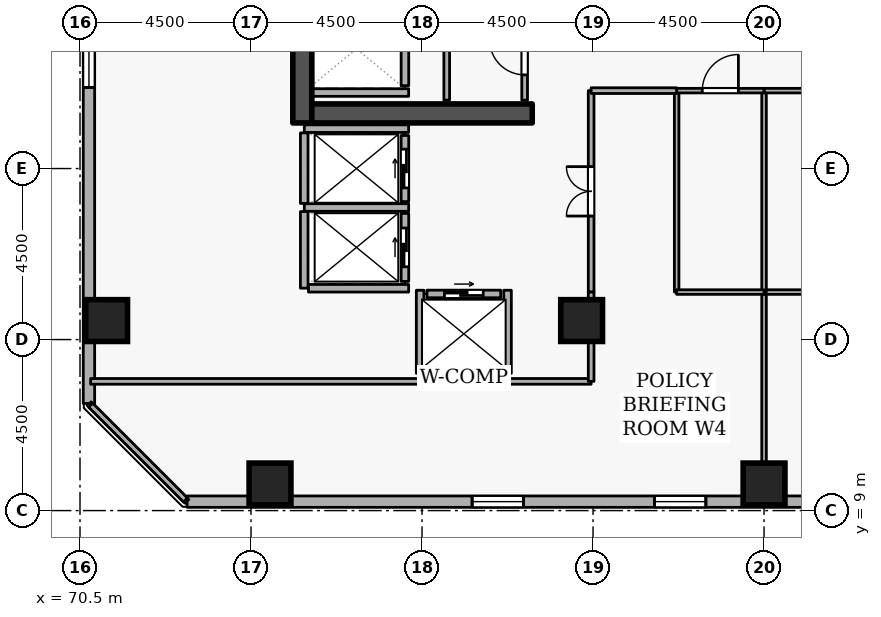
"""IFC4 building model, lengths in metres.
Left out: names, types, materials, properties, quantities, classifications, styles, units other than length and angle.
Written with IfcOpenShell. Run it as: python <this file> out.ifc"""

import sys

from ifc_helpers import new_model, si_unit, direction, frame, frame_2d, origin, origin_2d, place, context, subcontext, project, spatial, rectangle, extrude, element, fill, save


model = new_model("IFC4")
c1 = context("Model", 3, precision=1e-05, world=origin(), true_north=direction((0.0, 1.0)))
c2 = subcontext(c1, "Body", "Model", "MODEL_VIEW")
j1 = project(units=[si_unit("LENGTHUNIT", "METRE"), si_unit("PLANEANGLEUNIT", "RADIAN")], contexts=[c1])
p1 = place(None, origin())
s1 = spatial("IfcSite", under=j1, at=p1, CompositionType="ELEMENT")
p2 = place(p1, origin())
s2 = spatial("IfcBuilding", under=s1, at=p2, CompositionType="ELEMENT")
p3 = place(p2, frame((0.0, 0.0, 170.7)))
s3 = spatial("IfcBuildingStorey", under=s2, at=p3, CompositionType="ELEMENT", Elevation=170.7)
p4 = place(p3, frame((76.35, 19.2, 0.0), z_axis=(0.0, 0.0, 1.0), x_axis=(0.0, 1.0, 0.0)))
e1 = element("IfcWall", 1, at=p4, inside=s3, PredefinedType="SHEAR", context=c2, shape_type="SweptSolid", body=[
    extrude(rectangle(XDim=15.6, YDim=0.5, at=frame_2d((7.8, 0.0))), origin(), (0.0, 0.0, 1.0), 3.6),
])
p5 = place(p3, frame((76.6, 19.45, 0.0), z_axis=(0.0, 0.0, 1.0), x_axis=(1.0, 0.0, 0.0)))
e2 = element("IfcWall", 2, at=p5, inside=s3, PredefinedType="SHEAR", context=c2, shape_type="SweptSolid", body=[
    extrude(rectangle(XDim=5.8, YDim=0.5, at=frame_2d((2.9, 0.0))), origin(), (0.0, 0.0, 1.0), 3.6),
])
for number, where, z_axis, x_axis in (
    (3, (71.2, 14.0, 0.0), (0.0, 0.0, 1.0), (1.0, 0.0, 0.0)),
    (4, (88.5, 9.7, 0.0), (0.0, 0.0, 1.0), (1.0, 0.0, 0.0)),
    (5, (75.5, 9.7, 0.0), (0.0, 0.0, 1.0), (1.0, 0.0, 0.0)),
    (6, (83.7, 14.0, 0.0), (0.0, 0.0, 1.0), (1.0, 0.0, 0.0)),
):
    element("IfcColumn", number, at=place(p3, frame(where, z_axis=z_axis, x_axis=x_axis)), inside=s3, PredefinedType="COLUMN", context=c2, shape_type="SweptSolid", body=[
        extrude(rectangle(XDim=1.1, YDim=1.1, at=origin_2d()), origin(), (0.0, 0.0, 1.0), 3.6),
    ])
p6 = place(p3, frame((73.319, 9.235, 0.0), z_axis=(0.0, 0.0, 1.0), x_axis=(1.0, 0.0, 0.0)))
e7 = element("IfcWall", 7, at=p6, inside=s3, PredefinedType="STANDARD", context=c2, shape_type="SweptSolid", body=[
    extrude(rectangle(XDim=36.363, YDim=0.3, at=frame_2d((18.181, 0.0))), origin(), (0.0, 0.0, 1.0), 2.22),
])
p7 = place(p6, frame((7.5, 0.0, 0.72)))
e8 = element("IfcOpeningElement", 8, at=p7, cuts=e7, PredefinedType="OPENING", context=c2, shape_type="SweptSolid", body=[
    extrude(rectangle(XDim=1.35, YDim=1.05, at=frame_2d((0.675, 0.525))), frame((0.0, 0.16, 0.0), z_axis=(0.0, -1.0, 0.0), x_axis=(1.0, 0.0, 0.0)), (0.0, 0.0, 1.0), 0.32),
])
p8 = place(p6, frame((12.3, 0.0, 0.72)))
e9 = element("IfcOpeningElement", 9, at=p8, cuts=e7, PredefinedType="OPENING", context=c2, shape_type="SweptSolid", body=[
    extrude(rectangle(XDim=1.35, YDim=1.05, at=frame_2d((0.675, 0.525))), frame((0.0, 0.16, 0.0), z_axis=(0.0, -1.0, 0.0), x_axis=(1.0, 0.0, 0.0)), (0.0, 0.0, 1.0), 0.32),
])
p9 = place(p6, frame((17.1, 0.0, 0.72)))
e10 = element("IfcOpeningElement", 10, at=p9, cuts=e7, PredefinedType="OPENING", context=c2, shape_type="SweptSolid", body=[
    extrude(rectangle(XDim=1.35, YDim=1.05, at=frame_2d((0.675, 0.525))), frame((0.0, 0.16, 0.0), z_axis=(0.0, -1.0, 0.0), x_axis=(1.0, 0.0, 0.0)), (0.0, 0.0, 1.0), 0.32),
])
p10 = place(p6, frame((21.9, 0.0, 0.72)))
e11 = element("IfcOpeningElement", 11, at=p10, cuts=e7, PredefinedType="OPENING", context=c2, shape_type="SweptSolid", body=[
    extrude(rectangle(XDim=1.35, YDim=1.05, at=frame_2d((0.675, 0.525))), frame((0.0, 0.16, 0.0), z_axis=(0.0, -1.0, 0.0), x_axis=(1.0, 0.0, 0.0)), (0.0, 0.0, 1.0), 0.32),
])
p11 = place(p6, frame((31.5, 0.0, 0.72)))
e12 = element("IfcOpeningElement", 12, at=p11, cuts=e7, PredefinedType="OPENING", context=c2, shape_type="SweptSolid", body=[
    extrude(rectangle(XDim=1.35, YDim=1.05, at=frame_2d((0.675, 0.525))), frame((0.0, 0.16, 0.0), z_axis=(0.0, -1.0, 0.0), x_axis=(1.0, 0.0, 0.0)), (0.0, 0.0, 1.0), 0.32),
])
p12 = place(p3, frame((70.735, 48.181, 0.0), z_axis=(0.0, 0.0, 1.0), x_axis=(0.0, -1.0, 0.0)))
e13 = element("IfcWall", 13, at=p12, inside=s3, PredefinedType="STANDARD", context=c2, shape_type="SweptSolid", body=[
    extrude(rectangle(XDim=36.363, YDim=0.3, at=frame_2d((18.181, 0.0))), origin(), (0.0, 0.0, 1.0), 2.22),
])
p13 = place(p12, frame((2.7, 0.0, 0.72)))
e14 = element("IfcOpeningElement", 14, at=p13, cuts=e13, PredefinedType="OPENING", context=c2, shape_type="SweptSolid", body=[
    extrude(rectangle(XDim=1.35, YDim=1.05, at=frame_2d((0.675, 0.525))), frame((0.0, 0.16, 0.0), z_axis=(0.0, -1.0, 0.0), x_axis=(1.0, 0.0, 0.0)), (0.0, 0.0, 1.0), 0.32),
])
p14 = place(p12, frame((12.3, 0.0, 0.72)))
e15 = element("IfcOpeningElement", 15, at=p14, cuts=e13, PredefinedType="OPENING", context=c2, shape_type="SweptSolid", body=[
    extrude(rectangle(XDim=1.35, YDim=1.05, at=frame_2d((0.675, 0.525))), frame((0.0, 0.16, 0.0), z_axis=(0.0, -1.0, 0.0), x_axis=(1.0, 0.0, 0.0)), (0.0, 0.0, 1.0), 0.32),
])
p15 = place(p12, frame((17.1, 0.0, 0.72)))
e16 = element("IfcOpeningElement", 16, at=p15, cuts=e13, PredefinedType="OPENING", context=c2, shape_type="SweptSolid", body=[
    extrude(rectangle(XDim=1.35, YDim=1.05, at=frame_2d((0.675, 0.525))), frame((0.0, 0.16, 0.0), z_axis=(0.0, -1.0, 0.0), x_axis=(1.0, 0.0, 0.0)), (0.0, 0.0, 1.0), 0.32),
])
p16 = place(p12, frame((26.7, 0.0, 0.72)))
e17 = element("IfcOpeningElement", 17, at=p16, cuts=e13, PredefinedType="OPENING", context=c2, shape_type="SweptSolid", body=[
    extrude(rectangle(XDim=1.35, YDim=1.05, at=frame_2d((0.675, 0.525))), frame((0.0, 0.16, 0.0), z_axis=(0.0, -1.0, 0.0), x_axis=(1.0, 0.0, 0.0)), (0.0, 0.0, 1.0), 0.32),
])
p17 = place(p3, frame((79.05, 20.18, 0.0), z_axis=(0.0, 0.0, 1.0), x_axis=(0.0, 1.0, 0.0)))
e18 = element("IfcWall", 18, at=p17, inside=s3, PredefinedType="STANDARD", context=c2, shape_type="SweptSolid", body=[
    extrude(rectangle(XDim=1.94, YDim=0.2, at=frame_2d((0.97, 0.0))), origin(), (0.0, 0.0, 1.0), 3.26),
])
p18 = place(p3, frame((79.05, 17.13, 0.0), z_axis=(0.0, 0.0, 1.0), x_axis=(0.0, 1.0, 0.0)))
e19 = element("IfcWall", 19, at=p18, inside=s3, PredefinedType="STANDARD", context=c2, shape_type="SweptSolid", body=[
    extrude(rectangle(XDim=1.74, YDim=0.2, at=frame_2d((0.87, 0.0))), origin(), (0.0, 0.0, 1.0), 3.26),
])
p19 = place(p18, frame((0.36, 0.0, 0.0)))
e20 = element("IfcOpeningElement", 20, at=p19, cuts=e19, PredefinedType="OPENING", context=c2, shape_type="SweptSolid", body=[
    extrude(rectangle(XDim=1.02, YDim=2.06, at=frame_2d((0.51, 1.03))), frame((0.0, 0.11, 0.0), z_axis=(0.0, -1.0, 0.0), x_axis=(1.0, 0.0, 0.0)), (0.0, 0.0, 1.0), 0.22),
])
p20 = place(p3, frame((79.05, 15.03, 0.0), z_axis=(0.0, 0.0, 1.0), x_axis=(0.0, 1.0, 0.0)))
e21 = element("IfcWall", 21, at=p20, inside=s3, PredefinedType="STANDARD", context=c2, shape_type="SweptSolid", body=[
    extrude(rectangle(XDim=1.79, YDim=0.2, at=frame_2d((0.895, 0.0))), origin(), (0.0, 0.0, 1.0), 3.26),
])
p21 = place(p20, frame((0.385, 0.0, 0.0)))
e22 = element("IfcOpeningElement", 22, at=p21, cuts=e21, PredefinedType="OPENING", context=c2, shape_type="SweptSolid", body=[
    extrude(rectangle(XDim=1.02, YDim=2.06, at=frame_2d((0.51, 1.03))), frame((0.0, 0.11, 0.0), z_axis=(0.0, -1.0, 0.0), x_axis=(1.0, 0.0, 0.0)), (0.0, 0.0, 1.0), 0.22),
])
p22 = place(p3, frame((79.63, 14.7, 0.0), z_axis=(0.0, 0.0, 1.0), x_axis=(1.0, 0.0, 0.0)))
e23 = element("IfcWall", 23, at=p22, inside=s3, PredefinedType="STANDARD", context=c2, shape_type="SweptSolid", body=[
    extrude(rectangle(XDim=1.94, YDim=0.2, at=frame_2d((0.97, 0.0))), origin(), (0.0, 0.0, 1.0), 3.26),
])
p23 = place(p22, frame((0.46, 0.0, 0.0)))
e24 = element("IfcOpeningElement", 24, at=p23, cuts=e23, PredefinedType="OPENING", context=c2, shape_type="SweptSolid", body=[
    extrude(rectangle(XDim=1.02, YDim=2.06, at=frame_2d((0.51, 1.03))), frame((0.0, 0.11, 0.0), z_axis=(0.0, -1.0, 0.0), x_axis=(1.0, 0.0, 0.0)), (0.0, 0.0, 1.0), 0.22),
])
p24 = place(p3, frame((76.612, 20.0, 0.0), z_axis=(0.0, 0.0, 1.0), x_axis=(1.0, 0.0, 0.0)))
e25 = element("IfcWall", 25, at=p24, inside=s3, PredefinedType="STANDARD", context=c2, shape_type="SweptSolid", body=[
    extrude(rectangle(XDim=2.536, YDim=0.2, at=frame_2d((1.268, 0.0))), origin(), (0.0, 0.0, 1.0), 3.26),
])
p25 = place(p3, frame((76.402, 19.05, 0.0), z_axis=(0.0, 0.0, 1.0), x_axis=(1.0, 0.0, 0.0)))
e26 = element("IfcWall", 26, at=p25, inside=s3, PredefinedType="STANDARD", context=c2, shape_type="SweptSolid", body=[
    extrude(rectangle(XDim=2.746, YDim=0.2, at=frame_2d((1.373, 0.0))), origin(), (0.0, 0.0, 1.0), 2.465),
])
p26 = place(p3, frame((76.402, 16.975, 0.0), z_axis=(0.0, 0.0, 1.0), x_axis=(1.0, 0.0, 0.0)))
e27 = element("IfcWall", 27, at=p26, inside=s3, PredefinedType="STANDARD", context=c2, shape_type="SweptSolid", body=[
    extrude(rectangle(XDim=2.746, YDim=0.2, at=frame_2d((1.373, 0.0))), origin(), (0.0, 0.0, 1.0), 3.26),
])
p27 = place(p3, frame((76.4, 14.852, 0.0), z_axis=(0.0, 0.0, 1.0), x_axis=(0.0, 1.0, 0.0)))
e28 = element("IfcWall", 28, at=p27, inside=s3, PredefinedType="STANDARD", context=c2, shape_type="SweptSolid", body=[
    extrude(rectangle(XDim=2.016, YDim=0.2, at=frame_2d((1.008, 0.0))), origin(), (0.0, 0.0, 1.0), 3.26),
])
p28 = place(p3, frame((76.4, 17.082, 0.0), z_axis=(0.0, 0.0, 1.0), x_axis=(0.0, 1.0, 0.0)))
e29 = element("IfcWall", 29, at=p28, inside=s3, PredefinedType="STANDARD", context=c2, shape_type="SweptSolid", body=[
    extrude(rectangle(XDim=1.856, YDim=0.2, at=frame_2d((0.928, 0.0))), origin(), (0.0, 0.0, 1.0), 3.26),
])
p29 = place(p3, frame((76.512, 14.85, 0.0), z_axis=(0.0, 0.0, 1.0), x_axis=(1.0, 0.0, 0.0)))
e30 = element("IfcWall", 30, at=p29, inside=s3, PredefinedType="STANDARD", context=c2, shape_type="SweptSolid", body=[
    extrude(rectangle(XDim=2.636, YDim=0.2, at=frame_2d((1.318, 0.0))), origin(), (0.0, 0.0, 1.0), 3.26),
])
p30 = place(p3, frame((79.452, 12.5, 0.0), z_axis=(0.0, 0.0, 1.0), x_axis=(1.0, 0.0, 0.0)))
e31 = element("IfcWall", 31, at=p30, inside=s3, PredefinedType="STANDARD", context=c2, shape_type="SweptSolid", body=[
    extrude(rectangle(XDim=2.296, YDim=0.2, at=frame_2d((1.148, 0.0))), origin(), (0.0, 0.0, 1.0), 3.26),
])
for number, where, z_axis, x_axis in (
    (32, (81.75, 12.612, 0.0), (0.0, 0.0, 1.0), (0.0, 1.0, 0.0)),
    (33, (79.45, 12.612, 0.0), (0.0, 0.0, 1.0), (0.0, 1.0, 0.0)),
):
    element("IfcWall", number, at=place(p3, frame(where, z_axis=z_axis, x_axis=x_axis)), inside=s3, PredefinedType="STANDARD", context=c2, shape_type="SweptSolid", body=[
        extrude(rectangle(XDim=2.186, YDim=0.2, at=frame_2d((1.093, 0.0))), origin(), (0.0, 0.0, 1.0), 3.26),
    ])
p31 = place(p3, frame((82.2, 19.8, 0.0), z_axis=(0.0, 0.0, 1.0), x_axis=(0.0, 1.0, 0.0)))
e34 = element("IfcWall", 34, at=p31, inside=s3, PredefinedType="PARTITIONING", context=c2, shape_type="SweptSolid", body=[
    extrude(rectangle(XDim=2.25, YDim=0.15, at=frame_2d((1.125, 0.0))), origin(), (0.0, 0.0, 1.0), 3.26),
])
p32 = place(p31, frame((0.665, 0.0, 0.0)))
e35 = element("IfcOpeningElement", 35, at=p32, cuts=e34, PredefinedType="OPENING", context=c2, shape_type="SweptSolid", body=[
    extrude(rectangle(XDim=0.92, YDim=2.08, at=frame_2d((0.46, 1.04))), frame((0.0, 0.085, 0.0), z_axis=(0.0, -1.0, 0.0), x_axis=(1.0, 0.0, 0.0)), (0.0, 0.0, 1.0), 0.17),
])
p33 = place(p3, frame((80.15, 22.05, 0.0), z_axis=(0.0, 0.0, 1.0), x_axis=(0.0, -1.0, 0.0)))
e36 = element("IfcWall", 36, at=p33, inside=s3, PredefinedType="PARTITIONING", context=c2, shape_type="SweptSolid", body=[
    extrude(rectangle(XDim=2.25, YDim=0.15, at=frame_2d((1.125, 0.0))), origin(), (0.0, 0.0, 1.0), 3.26),
])
p34 = place(p3, frame((88.5, 9.28, 0.0), z_axis=(0.0, 0.0, 1.0), x_axis=(0.0, 1.0, 0.0)))
e37 = element("IfcWall", 37, at=p34, inside=s3, PredefinedType="PARTITIONING", context=c2, shape_type="SweptSolid", body=[
    extrude(rectangle(XDim=5.47, YDim=0.12, at=frame_2d((2.735, 0.0))), origin(), (0.0, 0.0, 1.0), 2.802),
])
p35 = place(p3, frame((88.5, 14.75, 0.0), z_axis=(0.0, 0.0, 1.0), x_axis=(1.0, 0.0, 0.0)))
e38 = element("IfcWall", 38, at=p35, inside=s3, PredefinedType="PARTITIONING", context=c2, shape_type="SweptSolid", body=[
    extrude(rectangle(XDim=4.55, YDim=0.12, at=frame_2d((2.275, 0.0))), origin(), (0.0, 0.0, 1.0), 3.26),
])
p36 = place(p3, frame((88.5, 14.75, 0.0), z_axis=(0.0, 0.0, 1.0), x_axis=(0.0, 1.0, 0.0)))
e39 = element("IfcWall", 39, at=p36, inside=s3, PredefinedType="PARTITIONING", context=c2, shape_type="SweptSolid", body=[
    extrude(rectangle(XDim=5.3, YDim=0.12, at=frame_2d((2.65, 0.0))), origin(), (0.0, 0.0, 1.0), 2.802),
])
p37 = place(p3, frame((88.5, 20.05, 0.0), z_axis=(0.0, 0.0, 1.0), x_axis=(1.0, 0.0, 0.0)))
e40 = element("IfcWall", 40, at=p37, inside=s3, PredefinedType="PARTITIONING", context=c2, shape_type="SweptSolid", body=[
    extrude(rectangle(XDim=4.55, YDim=0.12, at=frame_2d((2.275, 0.0))), origin(), (0.0, 0.0, 1.0), 3.26),
])
p38 = place(p3, frame((86.2, 14.75, 0.0), z_axis=(0.0, 0.0, 1.0), x_axis=(0.0, 1.0, 0.0)))
e41 = element("IfcWall", 41, at=p38, inside=s3, PredefinedType="PARTITIONING", context=c2, shape_type="SweptSolid", body=[
    extrude(rectangle(XDim=5.3, YDim=0.12, at=frame_2d((2.65, 0.0))), origin(), (0.0, 0.0, 1.0), 3.26),
])
p39 = place(p3, frame((86.2, 20.05, 0.0), z_axis=(0.0, 0.0, 1.0), x_axis=(1.0, 0.0, 0.0)))
e42 = element("IfcWall", 42, at=p39, inside=s3, PredefinedType="PARTITIONING", context=c2, shape_type="SweptSolid", body=[
    extrude(rectangle(XDim=2.3, YDim=0.12, at=frame_2d((1.15, 0.0))), origin(), (0.0, 0.0, 1.0), 3.26),
])
p40 = place(p39, frame((0.675, 0.0, 0.0)))
e43 = element("IfcOpeningElement", 43, at=p40, cuts=e42, PredefinedType="OPENING", context=c2, shape_type="SweptSolid", body=[
    extrude(rectangle(XDim=0.95, YDim=2.1, at=frame_2d((0.475, 1.05))), frame((0.0, 0.07, 0.0), z_axis=(0.0, -1.0, 0.0), x_axis=(1.0, 0.0, 0.0)), (0.0, 0.0, 1.0), 0.14),
])
p41 = place(p3, frame((88.5, 14.75, 0.0), z_axis=(0.0, 0.0, 1.0), x_axis=(-1.0, 0.0, 0.0)))
e44 = element("IfcWall", 44, at=p41, inside=s3, PredefinedType="PARTITIONING", context=c2, shape_type="SweptSolid", body=[
    extrude(rectangle(XDim=2.3, YDim=0.12, at=frame_2d((1.15, 0.0))), origin(), (0.0, 0.0, 1.0), 3.26),
])
p42 = place(p3, frame((83.95, 14.75, 0.0), z_axis=(0.0, 0.0, 1.0), x_axis=(0.0, 1.0, 0.0)))
e45 = element("IfcWall", 45, at=p42, inside=s3, PredefinedType="PARTITIONING", context=c2, shape_type="SweptSolid", body=[
    extrude(rectangle(XDim=5.3, YDim=0.15, at=frame_2d((2.65, 0.0))), origin(), (0.0, 0.0, 1.0), 3.26),
])
p43 = place(p42, frame((2.0, 0.0, 0.0)))
e46 = element("IfcOpeningElement", 46, at=p43, cuts=e45, PredefinedType="OPENING", context=c2, shape_type="SweptSolid", body=[
    extrude(rectangle(XDim=1.3, YDim=2.12, at=frame_2d((0.65, 1.06))), frame((0.0, 0.085, 0.0), z_axis=(0.0, -1.0, 0.0), x_axis=(1.0, 0.0, 0.0)), (0.0, 0.0, 1.0), 0.17),
])
p44 = place(p3, frame((83.95, 20.05, 0.0), z_axis=(0.0, 0.0, 1.0), x_axis=(1.0, 0.0, 0.0)))
e47 = element("IfcWall", 47, at=p44, inside=s3, PredefinedType="PARTITIONING", context=c2, shape_type="SweptSolid", body=[
    extrude(rectangle(XDim=2.25, YDim=0.15, at=frame_2d((1.125, 0.0))), origin(), (0.0, 0.0, 1.0), 3.26),
])
p45 = place(p3, frame((73.275, 9.28, 0.0), z_axis=(0.0, 0.0, 1.0), x_axis=(-0.707106781187, 0.707106781187, 0.0)))
e48 = element("IfcWall", 48, at=p45, inside=s3, PredefinedType="PARTITIONING", context=c2, shape_type="SweptSolid", body=[
    extrude(rectangle(XDim=3.528, YDim=0.15, at=frame_2d((1.764, 0.0))), origin(), (0.0, 0.0, 1.0), 3.26),
])
p46 = place(p3, frame((70.78, 12.4, 0.0), z_axis=(0.0, 0.0, 1.0), x_axis=(1.0, 0.0, 0.0)))
e49 = element("IfcWall", 49, at=p46, inside=s3, PredefinedType="PARTITIONING", context=c2, shape_type="SweptSolid", body=[
    extrude(rectangle(XDim=8.672, YDim=0.15, at=frame_2d((4.336, 0.0))), origin(), (0.0, 0.0, 1.0), 3.26),
])
p47 = place(p3, frame((81.748, 12.4, 0.0), z_axis=(0.0, 0.0, 1.0), x_axis=(1.0, 0.0, 0.0)))
e50 = element("IfcWall", 50, at=p47, inside=s3, PredefinedType="PARTITIONING", context=c2, shape_type="SweptSolid", body=[
    extrude(rectangle(XDim=2.202, YDim=0.15, at=frame_2d((1.101, 0.0))), origin(), (0.0, 0.0, 1.0), 3.26),
])
p48 = place(p3, frame((83.95, 12.4, 0.0), z_axis=(0.0, 0.0, 1.0), x_axis=(0.0, 1.0, 0.0)))
e51 = element("IfcWall", 51, at=p48, inside=s3, PredefinedType="PARTITIONING", context=c2, shape_type="SweptSolid", body=[
    extrude(rectangle(XDim=2.35, YDim=0.15, at=frame_2d((1.175, 0.0))), origin(), (0.0, 0.0, 1.0), 3.26),
])
p49 = place(p7, origin())
e52 = element("IfcWindow", 52, at=p49, inside=s3, PartitioningType="SINGLE_PANEL", PredefinedType="WINDOW", context=c2, shape_type="SweptSolid", body=[
    extrude(rectangle(XDim=1.35, YDim=1.05, at=frame_2d((0.675, 0.525))), frame((0.0, 0.03, 0.0), z_axis=(0.0, -1.0, 0.0), x_axis=(1.0, 0.0, 0.0)), (0.0, 0.0, 1.0), 0.06),
])
fill(e8, e52)
p50 = place(p8, origin())
e53 = element("IfcWindow", 53, at=p50, inside=s3, PartitioningType="SINGLE_PANEL", PredefinedType="WINDOW", context=c2, shape_type="SweptSolid", body=[
    extrude(rectangle(XDim=1.35, YDim=1.05, at=frame_2d((0.675, 0.525))), frame((0.0, 0.03, 0.0), z_axis=(0.0, -1.0, 0.0), x_axis=(1.0, 0.0, 0.0)), (0.0, 0.0, 1.0), 0.06),
])
fill(e9, e53)
p51 = place(p16, origin())
e54 = element("IfcWindow", 54, at=p51, inside=s3, PartitioningType="SINGLE_PANEL", PredefinedType="WINDOW", context=c2, shape_type="SweptSolid", body=[
    extrude(rectangle(XDim=1.35, YDim=1.05, at=frame_2d((0.675, 0.525))), frame((0.0, 0.03, 0.0), z_axis=(0.0, -1.0, 0.0), x_axis=(1.0, 0.0, 0.0)), (0.0, 0.0, 1.0), 0.06),
])
fill(e17, e54)
p52 = place(p19, origin())
e55 = element("IfcDoor", 55, at=p52, inside=s3, OperationType="SLIDING_TO_LEFT", PredefinedType="DOOR", context=c2, shape_type="SweptSolid", body=[
    extrude(rectangle(XDim=1.02, YDim=2.06, at=frame_2d((0.51, 1.03))), frame((0.0, 0.025, 0.0), z_axis=(0.0, -1.0, 0.0), x_axis=(1.0, 0.0, 0.0)), (0.0, 0.0, 1.0), 0.05),
])
fill(e20, e55)
p53 = place(p21, origin())
e56 = element("IfcDoor", 56, at=p53, inside=s3, OperationType="SLIDING_TO_LEFT", PredefinedType="DOOR", context=c2, shape_type="SweptSolid", body=[
    extrude(rectangle(XDim=1.02, YDim=2.06, at=frame_2d((0.51, 1.03))), frame((0.0, 0.025, 0.0), z_axis=(0.0, -1.0, 0.0), x_axis=(1.0, 0.0, 0.0)), (0.0, 0.0, 1.0), 0.05),
])
fill(e22, e56)
p54 = place(p23, origin())
e57 = element("IfcDoor", 57, at=p54, inside=s3, OperationType="SLIDING_TO_LEFT", PredefinedType="DOOR", context=c2, shape_type="SweptSolid", body=[
    extrude(rectangle(XDim=1.02, YDim=2.06, at=frame_2d((0.51, 1.03))), frame((0.0, 0.025, 0.0), z_axis=(0.0, -1.0, 0.0), x_axis=(1.0, 0.0, 0.0)), (0.0, 0.0, 1.0), 0.05),
])
fill(e24, e57)
p55 = place(p32, origin())
e58 = element("IfcDoor", 58, at=p55, inside=s3, OperationType="SINGLE_SWING_RIGHT", PredefinedType="DOOR", context=c2, shape_type="SweptSolid", body=[
    extrude(rectangle(XDim=0.92, YDim=2.08, at=frame_2d((0.46, 1.04))), frame((0.0, 0.025, 0.0), z_axis=(0.0, -1.0, 0.0), x_axis=(1.0, 0.0, 0.0)), (0.0, 0.0, 1.0), 0.05),
])
fill(e35, e58)
p56 = place(p40, origin())
e59 = element("IfcDoor", 59, at=p56, inside=s3, OperationType="SINGLE_SWING_RIGHT", PredefinedType="DOOR", context=c2, shape_type="SweptSolid", body=[
    extrude(rectangle(XDim=0.95, YDim=2.1, at=frame_2d((0.475, 1.05))), frame((0.0, 0.025, 0.0), z_axis=(0.0, -1.0, 0.0), x_axis=(1.0, 0.0, 0.0)), (0.0, 0.0, 1.0), 0.05),
])
fill(e43, e59)
p57 = place(p43, origin())
e60 = element("IfcDoor", 60, at=p57, inside=s3, OperationType="DOUBLE_DOOR_SINGLE_SWING", PredefinedType="DOOR", context=c2, shape_type="SweptSolid", body=[
    extrude(rectangle(XDim=1.3, YDim=2.12, at=frame_2d((0.65, 1.06))), frame((0.0, 0.025, 0.0), z_axis=(0.0, -1.0, 0.0), x_axis=(1.0, 0.0, 0.0)), (0.0, 0.0, 1.0), 0.05),
])
fill(e46, e60)
save(model, sys.argv[1])
